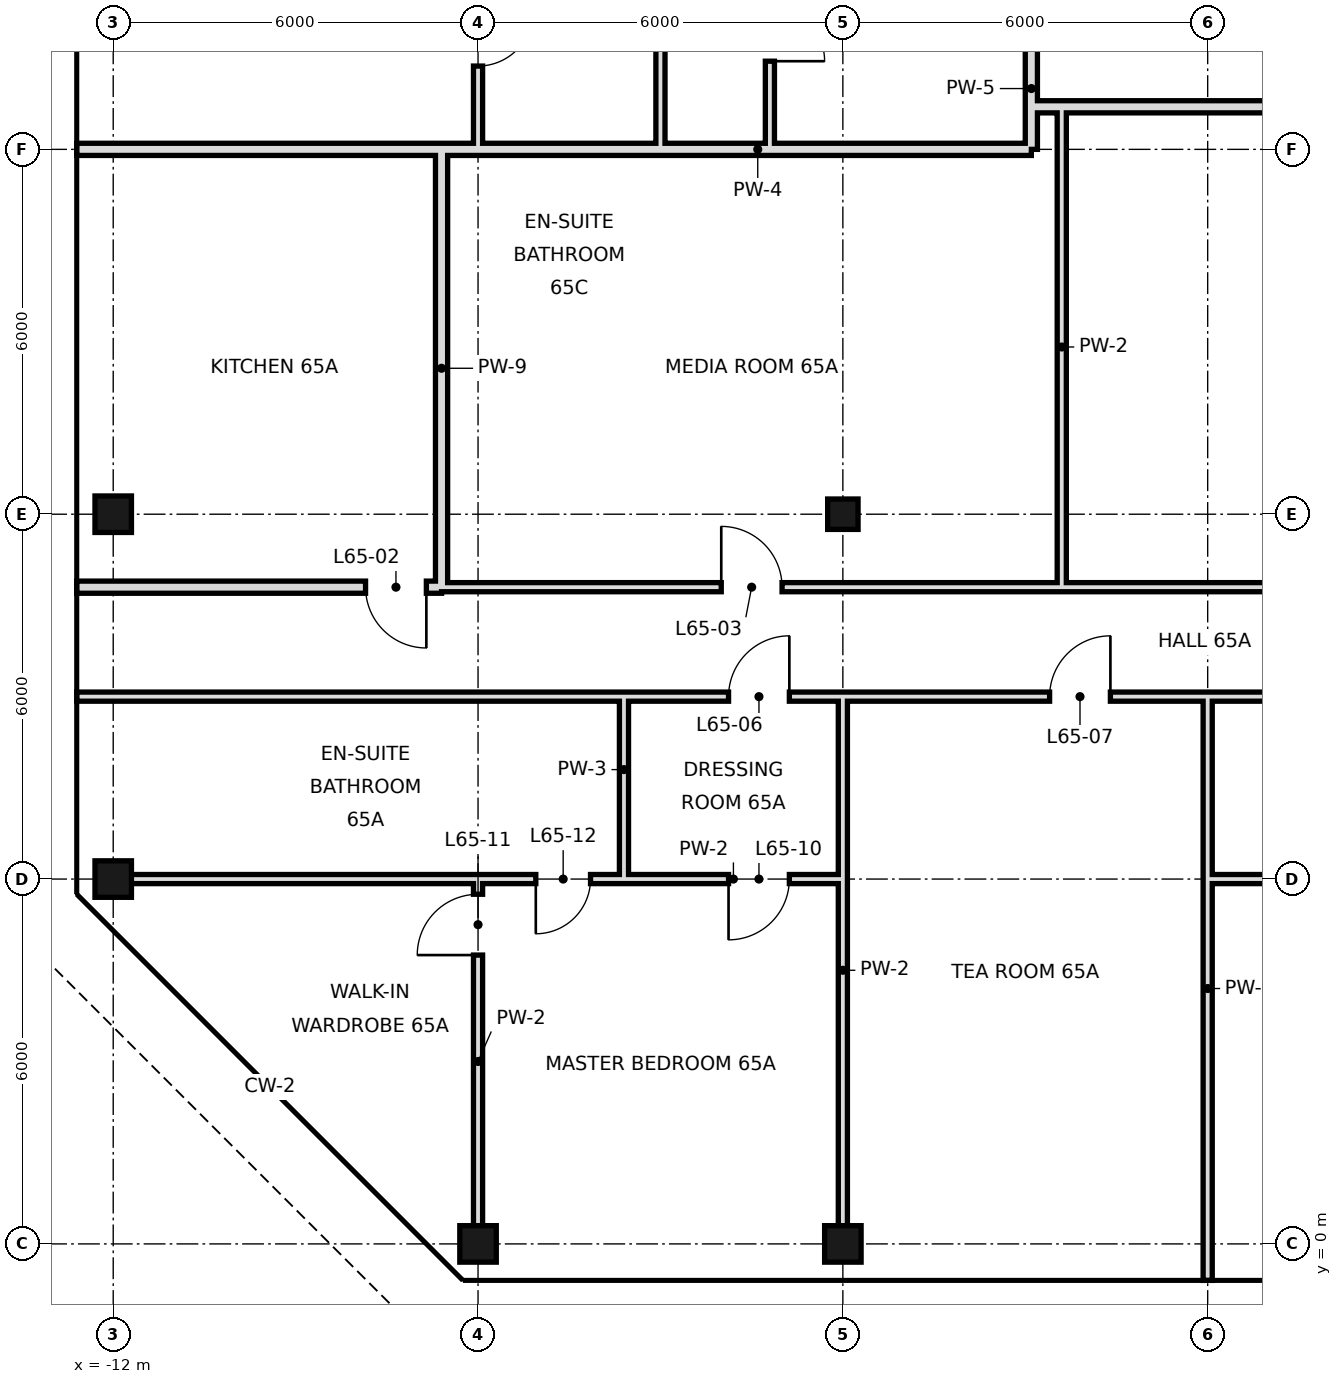
"""IFC4 building model, lengths in metres.
Left out: names, types, materials, properties, quantities, classifications, styles, units other than length and angle.
Written with IfcOpenShell. Run it as: python <this file> out.ifc"""

import sys

from ifc_helpers import new_model, si_unit, direction, frame, frame_2d, origin, origin_2d, place, context, subcontext, project, spatial, rectangle, hollow_rectangle, extrude, element, fill, save


model = new_model("IFC4")
c1 = context("Model", 3, precision=1e-05, world=origin(), true_north=direction((0.0, 1.0)))
c2 = subcontext(c1, "Body", "Model", "MODEL_VIEW")
j1 = project(units=[si_unit("LENGTHUNIT", "METRE"), si_unit("PLANEANGLEUNIT", "RADIAN")], contexts=[c1])
p1 = place(None, origin())
s1 = spatial("IfcSite", under=j1, at=p1, CompositionType="ELEMENT")
p2 = place(p1, origin())
s2 = spatial("IfcBuilding", under=s1, at=p2, CompositionType="ELEMENT")
p3 = place(p2, frame((0.0, 0.0, 273.8)))
s3 = spatial("IfcBuildingStorey", under=s2, at=p3, CompositionType="ELEMENT", Elevation=273.8)
for number, where, z_axis, x_axis in (
    (1, (-12.0, 6.0, 0.0), (0.0, 0.0, 1.0), (1.0, 0.0, 0.0)),
    (2, (-12.0, 12.0, 0.0), (0.0, 0.0, 1.0), (1.0, 0.0, 0.0)),
    (3, (-6.0, 0.0, 0.0), (0.0, 0.0, 1.0), (1.0, 0.0, 0.0)),
    (4, (0.0, 0.0, 0.0), (0.0, 0.0, 1.0), (1.0, 0.0, 0.0)),
):
    element("IfcColumn", number, at=place(p3, frame(where, z_axis=z_axis, x_axis=x_axis)), inside=s3, PredefinedType="COLUMN", context=c2, shape_type="SweptSolid", body=[
        extrude(hollow_rectangle(XDim=0.6, YDim=0.6, WallThickness=0.028, at=origin_2d()), origin(), (0.0, 0.0, 1.0), 3.6),
    ])
p4 = place(p3, frame((0.0, 12.0, 0.0), z_axis=(0.0, 0.0, 1.0), x_axis=(1.0, 0.0, 0.0)))
e5 = element("IfcColumn", 5, at=p4, inside=s3, PredefinedType="COLUMN", context=c2, shape_type="SweptSolid", body=[
    extrude(hollow_rectangle(XDim=0.5, YDim=0.5, WallThickness=0.025, at=origin_2d()), origin(), (0.0, 0.0, 1.0), 3.6),
])
p5 = place(p3, frame((-1.2, 18.0, 0.0), z_axis=(0.0, 0.0, 1.0), x_axis=(0.0, 1.0, 0.0)))
e6 = element("IfcWall", 6, at=p5, inside=s3, PredefinedType="PARTITIONING", context=c2, shape_type="SweptSolid", body=[
    extrude(rectangle(XDim=22.2, YDim=0.15, at=frame_2d((11.1, 0.0))), origin(), (0.0, 0.0, 1.0), 3.42),
])
p6 = place(p5, frame((6.64, 0.0, 0.0)))
e7 = element("IfcOpeningElement", 7, at=p6, cuts=e6, PredefinedType="OPENING", context=c2, shape_type="SweptSolid", body=[
    extrude(rectangle(XDim=1.0, YDim=2.4, at=frame_2d((0.5, 1.2))), frame((0.0, 0.085, 0.0), z_axis=(0.0, -1.0, 0.0), x_axis=(1.0, 0.0, 0.0)), (0.0, 0.0, 1.0), 0.17),
])
p7 = place(p5, frame((1.45, 0.0, 0.0)))
e8 = element("IfcOpeningElement", 8, at=p7, cuts=e6, PredefinedType="OPENING", context=c2, shape_type="SweptSolid", body=[
    extrude(rectangle(XDim=0.9, YDim=2.1, at=frame_2d((0.45, 1.05))), frame((0.0, 0.085, 0.0), z_axis=(0.0, -1.0, 0.0), x_axis=(1.0, 0.0, 0.0)), (0.0, 0.0, 1.0), 0.17),
])
p8 = place(p5, frame((15.7, 0.0, 0.0)))
e9 = element("IfcOpeningElement", 9, at=p8, cuts=e6, PredefinedType="OPENING", context=c2, shape_type="SweptSolid", body=[
    extrude(rectangle(XDim=1.0, YDim=2.4, at=frame_2d((0.5, 1.2))), frame((0.0, 0.085, 0.0), z_axis=(0.0, -1.0, 0.0), x_axis=(1.0, 0.0, 0.0)), (0.0, 0.0, 1.0), 0.17),
])
for number, where, z_axis, x_axis in (
    (10, (-3.0, 18.0, 0.0), (0.0, 0.0, 1.0), (0.0, 1.0, 0.0)),
    (11, (-3.6, 6.0, 0.0), (0.0, 0.0, 1.0), (0.0, 1.0, 0.0)),
):
    element("IfcWall", number, at=place(p3, frame(where, z_axis=z_axis, x_axis=x_axis)), inside=s3, PredefinedType="PARTITIONING", context=c2, shape_type="SweptSolid", body=[
        extrude(rectangle(XDim=3.0, YDim=0.15, at=frame_2d((1.5, 0.0))), origin(), (0.0, 0.0, 1.0), 3.42),
    ])
p9 = place(p3, frame((-6.0, 0.0, 0.0), z_axis=(0.0, 0.0, 1.0), x_axis=(0.0, 1.0, 0.0)))
e12 = element("IfcWall", 12, at=p9, inside=s3, PredefinedType="PARTITIONING", context=c2, shape_type="SweptSolid", body=[
    extrude(rectangle(XDim=6.0, YDim=0.15, at=frame_2d((3.0, 0.0))), origin(), (0.0, 0.0, 1.0), 3.42),
])
p10 = place(p9, frame((4.75, 0.0, 0.0)))
e13 = element("IfcOpeningElement", 13, at=p10, cuts=e12, PredefinedType="OPENING", context=c2, shape_type="SweptSolid", body=[
    extrude(rectangle(XDim=1.0, YDim=2.4, at=frame_2d((0.5, 1.2))), frame((0.0, 0.085, 0.0), z_axis=(0.0, -1.0, 0.0), x_axis=(1.0, 0.0, 0.0)), (0.0, 0.0, 1.0), 0.17),
])
p11 = place(p3, frame((-6.0, 18.0, 0.0), z_axis=(0.0, 0.0, 1.0), x_axis=(0.0, 1.0, 0.0)))
e14 = element("IfcWall", 14, at=p11, inside=s3, PredefinedType="PARTITIONING", context=c2, shape_type="SweptSolid", body=[
    extrude(rectangle(XDim=3.0, YDim=0.15, at=frame_2d((1.5, 0.0))), origin(), (0.0, 0.0, 1.0), 3.42),
])
p12 = place(p11, frame((1.37, 0.0, 0.0)))
e15 = element("IfcOpeningElement", 15, at=p12, cuts=e14, PredefinedType="OPENING", context=c2, shape_type="SweptSolid", body=[
    extrude(rectangle(XDim=0.9, YDim=2.4, at=frame_2d((0.45, 1.2))), frame((0.0, 0.085, 0.0), z_axis=(0.0, -1.0, 0.0), x_axis=(1.0, 0.0, 0.0)), (0.0, 0.0, 1.0), 0.17),
])
p13 = place(p3, frame((-6.6, 10.8, 0.0), z_axis=(0.0, 0.0, 1.0), x_axis=(0.0, 1.0, 0.0)))
e16 = element("IfcWall", 16, at=p13, inside=s3, PredefinedType="SOLIDWALL", context=c2, shape_type="SweptSolid", body=[
    extrude(rectangle(XDim=7.2, YDim=0.2, at=frame_2d((3.6, 0.0))), origin(), (0.0, 0.0, 1.0), 2.72),
])
p14 = place(p3, frame((0.0, 0.0, 0.0), z_axis=(0.0, 0.0, 1.0), x_axis=(0.0, 1.0, 0.0)))
e17 = element("IfcWall", 17, at=p14, inside=s3, PredefinedType="PARTITIONING", context=c2, shape_type="SweptSolid", body=[
    extrude(rectangle(XDim=9.0, YDim=0.15, at=frame_2d((4.5, 0.0))), origin(), (0.0, 0.0, 1.0), 2.72),
])
p15 = place(p3, frame((3.1, 18.7, 0.0), z_axis=(0.0, 0.0, 1.0), x_axis=(0.0, 1.0, 0.0)))
e18 = element("IfcWall", 18, at=p15, inside=s3, PredefinedType="SOLIDWALL", context=c2, shape_type="SweptSolid", body=[
    extrude(rectangle(XDim=21.5, YDim=0.2, at=frame_2d((10.75, 0.0))), origin(), (0.0, 0.0, 1.0), 2.97),
])
p16 = place(p15, frame((6.5, 0.0, 0.0)))
e19 = element("IfcOpeningElement", 19, at=p16, cuts=e18, PredefinedType="OPENING", context=c2, shape_type="SweptSolid", body=[
    extrude(rectangle(XDim=1.2, YDim=2.4, at=frame_2d((0.6, 1.2))), frame((0.0, 0.11, 0.0), z_axis=(0.0, -1.0, 0.0), x_axis=(1.0, 0.0, 0.0)), (0.0, 0.0, 1.0), 0.22),
])
p17 = place(p3, frame((3.1, 18.0, 0.0), z_axis=(0.0, 0.0, 1.0), x_axis=(0.0, 1.0, 0.0)))
e20 = element("IfcWall", 20, at=p17, inside=s3, PredefinedType="SOLIDWALL", context=c2, shape_type="SweptSolid", body=[
    extrude(rectangle(XDim=0.7, YDim=0.2, at=frame_2d((0.35, 0.0))), origin(), (0.0, 0.0, 1.0), 2.97),
])
p18 = place(p3, frame((3.6, 10.8, 0.0), z_axis=(0.0, 0.0, 1.0), x_axis=(0.0, 1.0, 0.0)))
e21 = element("IfcWall", 21, at=p18, inside=s3, PredefinedType="PARTITIONING", context=c2, shape_type="SweptSolid", body=[
    extrude(rectangle(XDim=7.9, YDim=0.15, at=frame_2d((3.95, 0.0))), origin(), (0.0, 0.0, 1.0), 3.42),
])
p19 = place(p3, frame((6.0, -0.6, 0.0), z_axis=(0.0, 0.0, 1.0), x_axis=(0.0, 1.0, 0.0)))
e22 = element("IfcWall", 22, at=p19, inside=s3, PredefinedType="PARTITIONING", context=c2, shape_type="SweptSolid", body=[
    extrude(rectangle(XDim=9.6, YDim=0.15, at=frame_2d((4.8, 0.0))), origin(), (0.0, 0.0, 1.0), 2.72),
])
p20 = place(p3, frame((-12.6, 10.8, 0.0), z_axis=(0.0, 0.0, 1.0), x_axis=(1.0, 0.0, 0.0)))
e23 = element("IfcWall", 23, at=p20, inside=s3, PredefinedType="SOLIDWALL", context=c2, shape_type="SweptSolid", body=[
    extrude(rectangle(XDim=6.0, YDim=0.2, at=frame_2d((3.0, 0.0))), origin(), (0.0, 0.0, 1.0), 2.97),
])
p21 = place(p20, frame((4.75, 0.0, 0.0)))
e24 = element("IfcOpeningElement", 24, at=p21, cuts=e23, PredefinedType="OPENING", context=c2, shape_type="SweptSolid", body=[
    extrude(rectangle(XDim=1.0, YDim=2.4, at=frame_2d((0.5, 1.2))), frame((0.0, 0.11, 0.0), z_axis=(0.0, -1.0, 0.0), x_axis=(1.0, 0.0, 0.0)), (0.0, 0.0, 1.0), 0.22),
])
p22 = place(p3, frame((-6.6, 10.8, 0.0), z_axis=(0.0, 0.0, 1.0), x_axis=(1.0, 0.0, 0.0)))
e25 = element("IfcWall", 25, at=p22, inside=s3, PredefinedType="PARTITIONING", context=c2, shape_type="SweptSolid", body=[
    extrude(rectangle(XDim=28.2, YDim=0.15, at=frame_2d((14.1, 0.0))), origin(), (0.0, 0.0, 1.0), 3.42),
])
p23 = place(p22, frame((25.6, 0.0, 0.0)))
e26 = element("IfcOpeningElement", 26, at=p23, cuts=e25, PredefinedType="OPENING", context=c2, shape_type="SweptSolid", body=[
    extrude(rectangle(XDim=1.0, YDim=2.4, at=frame_2d((0.5, 1.2))), frame((0.0, 0.085, 0.0), z_axis=(0.0, -1.0, 0.0), x_axis=(1.0, 0.0, 0.0)), (0.0, 0.0, 1.0), 0.17),
])
p24 = place(p22, frame((4.6, 0.0, 0.0)))
e27 = element("IfcOpeningElement", 27, at=p24, cuts=e25, PredefinedType="OPENING", context=c2, shape_type="SweptSolid", body=[
    extrude(rectangle(XDim=1.0, YDim=2.4, at=frame_2d((0.5, 1.2))), frame((0.0, 0.085, 0.0), z_axis=(0.0, -1.0, 0.0), x_axis=(1.0, 0.0, 0.0)), (0.0, 0.0, 1.0), 0.17),
])
p25 = place(p22, frame((15.7, 0.0, 0.0)))
e28 = element("IfcOpeningElement", 28, at=p25, cuts=e25, PredefinedType="OPENING", context=c2, shape_type="SweptSolid", body=[
    extrude(rectangle(XDim=1.0, YDim=2.4, at=frame_2d((0.5, 1.2))), frame((0.0, 0.085, 0.0), z_axis=(0.0, -1.0, 0.0), x_axis=(1.0, 0.0, 0.0)), (0.0, 0.0, 1.0), 0.17),
])
p26 = place(p3, frame((-12.6, 18.0, 0.0), z_axis=(0.0, 0.0, 1.0), x_axis=(1.0, 0.0, 0.0)))
e29 = element("IfcWall", 29, at=p26, inside=s3, PredefinedType="SOLIDWALL", context=c2, shape_type="SweptSolid", body=[
    extrude(rectangle(XDim=6.0, YDim=0.2, at=frame_2d((3.0, 0.0))), origin(), (0.0, 0.0, 1.0), 2.72),
])
p27 = place(p3, frame((-6.6, 18.0, 0.0), z_axis=(0.0, 0.0, 1.0), x_axis=(1.0, 0.0, 0.0)))
e30 = element("IfcWall", 30, at=p27, inside=s3, PredefinedType="SOLIDWALL", context=c2, shape_type="SweptSolid", body=[
    extrude(rectangle(XDim=9.7, YDim=0.2, at=frame_2d((4.85, 0.0))), origin(), (0.0, 0.0, 1.0), 2.72),
])
p28 = place(p3, frame((3.1, 18.7, 0.0), z_axis=(0.0, 0.0, 1.0), x_axis=(1.0, 0.0, 0.0)))
e31 = element("IfcWall", 31, at=p28, inside=s3, PredefinedType="SOLIDWALL", context=c2, shape_type="SweptSolid", body=[
    extrude(rectangle(XDim=20.9, YDim=0.2, at=frame_2d((10.45, 0.0))), origin(), (0.0, 0.0, 1.0), 2.72),
])
p29 = place(p28, frame((14.9, 0.0, 0.0)))
e32 = element("IfcOpeningElement", 32, at=p29, cuts=e31, PredefinedType="OPENING", context=c2, shape_type="SweptSolid", body=[
    extrude(rectangle(XDim=1.2, YDim=2.4, at=frame_2d((0.6, 1.2))), frame((0.0, 0.11, 0.0), z_axis=(0.0, -1.0, 0.0), x_axis=(1.0, 0.0, 0.0)), (0.0, 0.0, 1.0), 0.22),
])
p30 = place(p3, frame((-3.6, 6.0, 0.0), z_axis=(0.0, 0.0, 1.0), x_axis=(1.0, 0.0, 0.0)))
e33 = element("IfcWall", 33, at=p30, inside=s3, PredefinedType="PARTITIONING", context=c2, shape_type="SweptSolid", body=[
    extrude(rectangle(XDim=3.6, YDim=0.15, at=frame_2d((1.8, 0.0))), origin(), (0.0, 0.0, 1.0), 2.72),
])
p31 = place(p30, frame((1.72, 0.0, 0.0)))
e34 = element("IfcOpeningElement", 34, at=p31, cuts=e33, PredefinedType="OPENING", context=c2, shape_type="SweptSolid", body=[
    extrude(rectangle(XDim=1.0, YDim=2.4, at=frame_2d((0.5, 1.2))), frame((0.0, 0.085, 0.0), z_axis=(0.0, -1.0, 0.0), x_axis=(1.0, 0.0, 0.0)), (0.0, 0.0, 1.0), 0.17),
])
p32 = place(p3, frame((6.0, 6.0, 0.0), z_axis=(0.0, 0.0, 1.0), x_axis=(1.0, 0.0, 0.0)))
e35 = element("IfcWall", 35, at=p32, inside=s3, PredefinedType="PARTITIONING", context=c2, shape_type="SweptSolid", body=[
    extrude(rectangle(XDim=15.6, YDim=0.15, at=frame_2d((7.8, 0.0))), origin(), (0.0, 0.0, 1.0), 2.97),
])
p33 = place(p32, frame((7.04, 0.0, 0.0)))
e36 = element("IfcOpeningElement", 36, at=p33, cuts=e35, PredefinedType="OPENING", context=c2, shape_type="SweptSolid", body=[
    extrude(rectangle(XDim=1.8, YDim=2.4, at=frame_2d((0.9, 1.2))), frame((0.0, 0.085, 0.0), z_axis=(0.0, -1.0, 0.0), x_axis=(1.0, 0.0, 0.0)), (0.0, 0.0, 1.0), 0.17),
])
p34 = place(p32, frame((12.88, 0.0, 0.0)))
e37 = element("IfcOpeningElement", 37, at=p34, cuts=e35, PredefinedType="OPENING", context=c2, shape_type="SweptSolid", body=[
    extrude(rectangle(XDim=1.0, YDim=2.4, at=frame_2d((0.5, 1.2))), frame((0.0, 0.085, 0.0), z_axis=(0.0, -1.0, 0.0), x_axis=(1.0, 0.0, 0.0)), (0.0, 0.0, 1.0), 0.17),
])
p35 = place(p3, frame((-12.0, 6.0, 0.0), z_axis=(0.0, 0.0, 1.0), x_axis=(1.0, 0.0, 0.0)))
e38 = element("IfcWall", 38, at=p35, inside=s3, PredefinedType="PARTITIONING", context=c2, shape_type="SweptSolid", body=[
    extrude(rectangle(XDim=8.4, YDim=0.15, at=frame_2d((4.2, 0.0))), origin(), (0.0, 0.0, 1.0), 2.72),
])
p36 = place(p35, frame((6.95, 0.0, 0.0)))
e39 = element("IfcOpeningElement", 39, at=p36, cuts=e38, PredefinedType="OPENING", context=c2, shape_type="SweptSolid", body=[
    extrude(rectangle(XDim=0.9, YDim=2.4, at=frame_2d((0.45, 1.2))), frame((0.0, 0.085, 0.0), z_axis=(0.0, -1.0, 0.0), x_axis=(1.0, 0.0, 0.0)), (0.0, 0.0, 1.0), 0.17),
])
p37 = place(p3, frame((-3.6, 9.0, 0.0), z_axis=(0.0, 0.0, 1.0), x_axis=(1.0, 0.0, 0.0)))
e40 = element("IfcWall", 40, at=p37, inside=s3, PredefinedType="PARTITIONING", context=c2, shape_type="SweptSolid", body=[
    extrude(rectangle(XDim=25.2, YDim=0.15, at=frame_2d((12.6, 0.0))), origin(), (0.0, 0.0, 1.0), 3.42),
])
p38 = place(p37, frame((1.72, 0.0, 0.0)))
e41 = element("IfcOpeningElement", 41, at=p38, cuts=e40, PredefinedType="OPENING", context=c2, shape_type="SweptSolid", body=[
    extrude(rectangle(XDim=1.0, YDim=2.4, at=frame_2d((0.5, 1.2))), frame((0.0, 0.085, 0.0), z_axis=(0.0, -1.0, 0.0), x_axis=(1.0, 0.0, 0.0)), (0.0, 0.0, 1.0), 0.17),
])
p39 = place(p37, frame((7.0, 0.0, 0.0)))
e42 = element("IfcOpeningElement", 42, at=p39, cuts=e40, PredefinedType="OPENING", context=c2, shape_type="SweptSolid", body=[
    extrude(rectangle(XDim=1.0, YDim=2.4, at=frame_2d((0.5, 1.2))), frame((0.0, 0.085, 0.0), z_axis=(0.0, -1.0, 0.0), x_axis=(1.0, 0.0, 0.0)), (0.0, 0.0, 1.0), 0.17),
])
p40 = place(p37, frame((12.76, 0.0, 0.0)))
e43 = element("IfcOpeningElement", 43, at=p40, cuts=e40, PredefinedType="OPENING", context=c2, shape_type="SweptSolid", body=[
    extrude(rectangle(XDim=1.8, YDim=2.4, at=frame_2d((0.9, 1.2))), frame((0.0, 0.085, 0.0), z_axis=(0.0, -1.0, 0.0), x_axis=(1.0, 0.0, 0.0)), (0.0, 0.0, 1.0), 0.17),
])
p41 = place(p37, frame((22.48, 0.0, 0.0)))
e44 = element("IfcOpeningElement", 44, at=p41, cuts=e40, PredefinedType="OPENING", context=c2, shape_type="SweptSolid", body=[
    extrude(rectangle(XDim=1.0, YDim=2.4, at=frame_2d((0.5, 1.2))), frame((0.0, 0.085, 0.0), z_axis=(0.0, -1.0, 0.0), x_axis=(1.0, 0.0, 0.0)), (0.0, 0.0, 1.0), 0.17),
])
p42 = place(p3, frame((-12.6, 9.0, 0.0), z_axis=(0.0, 0.0, 1.0), x_axis=(1.0, 0.0, 0.0)))
e45 = element("IfcWall", 45, at=p42, inside=s3, PredefinedType="PARTITIONING", context=c2, shape_type="SweptSolid", body=[
    extrude(rectangle(XDim=9.0, YDim=0.15, at=frame_2d((4.5, 0.0))), origin(), (0.0, 0.0, 1.0), 3.42),
])
p43 = place(p21, origin())
e46 = element("IfcDoor", 46, at=p43, inside=s3, OperationType="SINGLE_SWING_RIGHT", PredefinedType="DOOR", context=c2, shape_type="SweptSolid", body=[
    extrude(rectangle(XDim=1.0, YDim=2.4, at=frame_2d((0.5, 1.2))), frame((0.0, 0.025, 0.0), z_axis=(0.0, -1.0, 0.0), x_axis=(1.0, 0.0, 0.0)), (0.0, 0.0, 1.0), 0.05),
])
fill(e24, e46)
p44 = place(p24, origin())
e47 = element("IfcDoor", 47, at=p44, inside=s3, OperationType="SINGLE_SWING_LEFT", PredefinedType="DOOR", context=c2, shape_type="SweptSolid", body=[
    extrude(rectangle(XDim=1.0, YDim=2.4, at=frame_2d((0.5, 1.2))), frame((0.0, 0.025, 0.0), z_axis=(0.0, -1.0, 0.0), x_axis=(1.0, 0.0, 0.0)), (0.0, 0.0, 1.0), 0.05),
])
fill(e27, e47)
p45 = place(p38, frame((1.0, 0.0, 0.0), z_axis=(0.0, 0.0, 1.0), x_axis=(-1.0, 0.0, 0.0)))
e48 = element("IfcDoor", 48, at=p45, inside=s3, OperationType="SINGLE_SWING_LEFT", PredefinedType="DOOR", context=c2, shape_type="SweptSolid", body=[
    extrude(rectangle(XDim=1.0, YDim=2.4, at=frame_2d((0.5, 1.2))), frame((0.0, 0.025, 0.0), z_axis=(0.0, -1.0, 0.0), x_axis=(1.0, 0.0, 0.0)), (0.0, 0.0, 1.0), 0.05),
])
fill(e41, e48)
p46 = place(p39, frame((1.0, 0.0, 0.0), z_axis=(0.0, 0.0, 1.0), x_axis=(-1.0, 0.0, 0.0)))
e49 = element("IfcDoor", 49, at=p46, inside=s3, OperationType="SINGLE_SWING_LEFT", PredefinedType="DOOR", context=c2, shape_type="SweptSolid", body=[
    extrude(rectangle(XDim=1.0, YDim=2.4, at=frame_2d((0.5, 1.2))), frame((0.0, 0.025, 0.0), z_axis=(0.0, -1.0, 0.0), x_axis=(1.0, 0.0, 0.0)), (0.0, 0.0, 1.0), 0.05),
])
fill(e42, e49)
p47 = place(p31, frame((1.0, 0.0, 0.0), z_axis=(0.0, 0.0, 1.0), x_axis=(-1.0, 0.0, 0.0)))
e50 = element("IfcDoor", 50, at=p47, inside=s3, OperationType="SINGLE_SWING_RIGHT", PredefinedType="DOOR", context=c2, shape_type="SweptSolid", body=[
    extrude(rectangle(XDim=1.0, YDim=2.4, at=frame_2d((0.5, 1.2))), frame((0.0, 0.025, 0.0), z_axis=(0.0, -1.0, 0.0), x_axis=(1.0, 0.0, 0.0)), (0.0, 0.0, 1.0), 0.05),
])
fill(e34, e50)
p48 = place(p10, origin())
e51 = element("IfcDoor", 51, at=p48, inside=s3, OperationType="SINGLE_SWING_LEFT", PredefinedType="DOOR", context=c2, shape_type="SweptSolid", body=[
    extrude(rectangle(XDim=1.0, YDim=2.4, at=frame_2d((0.5, 1.2))), frame((0.0, 0.025, 0.0), z_axis=(0.0, -1.0, 0.0), x_axis=(1.0, 0.0, 0.0)), (0.0, 0.0, 1.0), 0.05),
])
fill(e13, e51)
p49 = place(p36, frame((0.9, 0.0, 0.0), z_axis=(0.0, 0.0, 1.0), x_axis=(-1.0, 0.0, 0.0)))
e52 = element("IfcDoor", 52, at=p49, inside=s3, OperationType="SINGLE_SWING_RIGHT", PredefinedType="DOOR", context=c2, shape_type="SweptSolid", body=[
    extrude(rectangle(XDim=0.9, YDim=2.4, at=frame_2d((0.45, 1.2))), frame((0.0, 0.025, 0.0), z_axis=(0.0, -1.0, 0.0), x_axis=(1.0, 0.0, 0.0)), (0.0, 0.0, 1.0), 0.05),
])
fill(e39, e52)
p50 = place(p7, frame((0.9, 0.0, 0.0), z_axis=(0.0, 0.0, 1.0), x_axis=(-1.0, 0.0, 0.0)))
e53 = element("IfcDoor", 53, at=p50, inside=s3, OperationType="SINGLE_SWING_RIGHT", PredefinedType="DOOR", context=c2, shape_type="SweptSolid", body=[
    extrude(rectangle(XDim=0.9, YDim=2.1, at=frame_2d((0.45, 1.05))), frame((0.0, 0.025, 0.0), z_axis=(0.0, -1.0, 0.0), x_axis=(1.0, 0.0, 0.0)), (0.0, 0.0, 1.0), 0.05),
])
fill(e8, e53)
p51 = place(p12, origin())
e54 = element("IfcDoor", 54, at=p51, inside=s3, OperationType="SINGLE_SWING_RIGHT", PredefinedType="DOOR", context=c2, shape_type="SweptSolid", body=[
    extrude(rectangle(XDim=0.9, YDim=2.4, at=frame_2d((0.45, 1.2))), frame((0.0, 0.025, 0.0), z_axis=(0.0, -1.0, 0.0), x_axis=(1.0, 0.0, 0.0)), (0.0, 0.0, 1.0), 0.05),
])
fill(e15, e54)
save(model, sys.argv[1])
